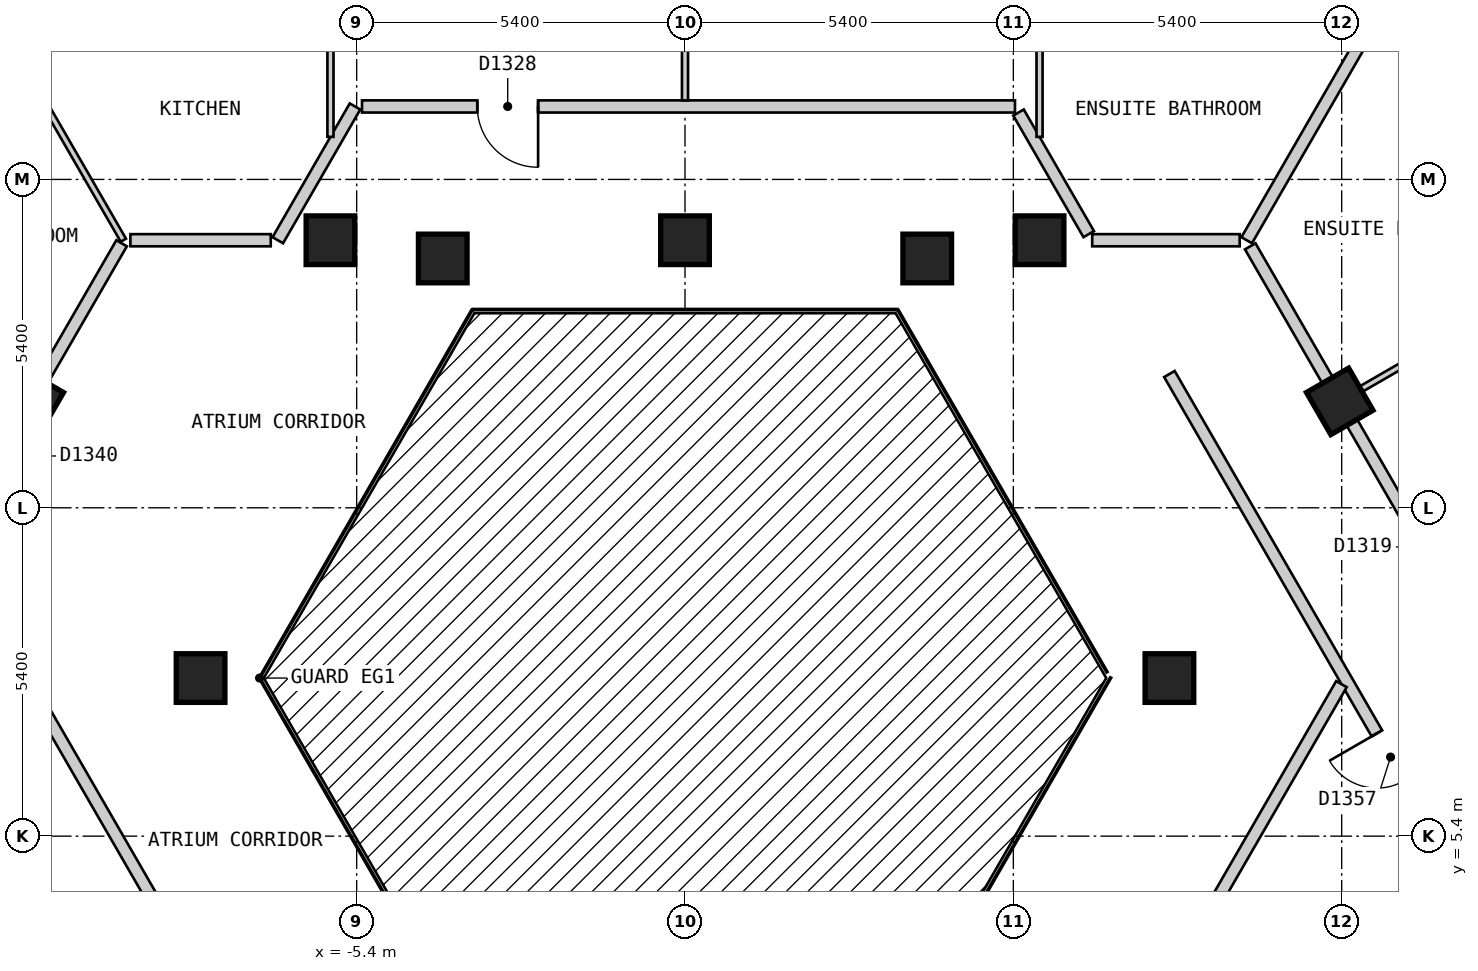
"""IFC4 building model, lengths in metres.
Left out: names, types, materials, properties, quantities, classifications, styles, units other than length and angle.
Written with IfcOpenShell. Run it as: python <this file> out.ifc"""

import sys

from ifc_helpers import new_model, si_unit, direction, frame, frame_2d, origin, origin_2d, place, context, subcontext, project, spatial, rectangle, extrude, element, fill, save


model = new_model("IFC4")
c1 = context("Model", 3, precision=1e-05, world=origin(), true_north=direction((0.0, 1.0)))
c2 = subcontext(c1, "Body", "Model", "MODEL_VIEW")
j1 = project(units=[si_unit("LENGTHUNIT", "METRE"), si_unit("PLANEANGLEUNIT", "RADIAN")], contexts=[c1])
p1 = place(None, origin())
s1 = spatial("IfcSite", under=j1, at=p1, CompositionType="ELEMENT")
p2 = place(p1, origin())
s2 = spatial("IfcBuilding", under=s1, at=p2, CompositionType="ELEMENT")
p3 = place(p2, frame((0.0, 0.0, 147.6)))
s3 = spatial("IfcBuildingStorey", under=s2, at=p3, CompositionType="ELEMENT", Elevation=147.6)
for number, where, z_axis, x_axis in (
    (1, (7.967, 8.0, 0.0), (0.0, 0.0, 1.0), (1.0, 0.0, 0.0)),
    (2, (10.768, 12.55, 0.0), (0.0, 0.0, 1.0), (-0.5, 0.866, 0.0)),
    (3, (5.831, 15.2, 0.0), (0.0, 0.0, 1.0), (-1.0, 0.0, 0.0)),
    (4, (3.984, 14.9, 0.0), (0.0, 0.0, 1.0), (1.0, 0.0, 0.0)),
    (5, (0.0, 15.2, 0.0), (0.0, 0.0, 1.0), (-1.0, 0.0, 0.0)),
    (6, (-3.984, 14.9, 0.0), (0.0, 0.0, 1.0), (1.0, 0.0, 0.0)),
    (7, (-5.831, 15.2, 0.0), (0.0, 0.0, 1.0), (-1.0, 0.0, 0.0)),
    (8, (-10.768, 12.55, 0.0), (0.0, 0.0, 1.0), (-0.5, -0.866, 0.0)),
    (9, (-7.967, 8.0, 0.0), (0.0, 0.0, 1.0), (1.0, 0.0, 0.0)),
):
    element("IfcColumn", number, at=place(p3, frame(where, z_axis=z_axis, x_axis=x_axis)), inside=s3, PredefinedType="COLUMN", context=c2, shape_type="SweptSolid", body=[
        extrude(rectangle(XDim=0.8, YDim=0.8, at=origin_2d()), origin(), (0.0, 0.0, 1.0), 3.0),
    ])
p4 = place(p3, frame((-10.796, 7.9, 0.0), z_axis=(0.0, 0.0, 1.0), x_axis=(0.499954271211, -0.866051803703, 0.0)))
e10 = element("IfcWall", 10, at=p4, inside=s3, PredefinedType="PARTITIONING", context=c2, shape_type="SweptSolid", body=[
    extrude(rectangle(XDim=7.536, YDim=0.2, at=frame_2d((3.768, 0.0))), origin(), (0.0, 0.0, 1.0), 2.7),
])
p5 = place(p3, frame((5.485, 17.3, 0.0), z_axis=(0.0, 0.0, 1.0), x_axis=(0.500027479704, -0.866009537788, 0.0)))
e11 = element("IfcWall", 11, at=p5, inside=s3, PredefinedType="PARTITIONING", context=c2, shape_type="SweptSolid", body=[
    extrude(rectangle(XDim=2.309, YDim=0.2, at=frame_2d((1.155, 0.0))), origin(), (0.0, 0.0, 1.0), 2.7),
])
p6 = place(p3, frame((7.967, 13.0, 0.0), z_axis=(0.0, 0.0, 1.0), x_axis=(0.50003774998, -0.866003607726, 0.0)))
e12 = element("IfcWall", 12, at=p6, inside=s3, PredefinedType="PARTITIONING", context=c2, shape_type="SweptSolid", body=[
    extrude(rectangle(XDim=14.433, YDim=0.2, at=frame_2d((7.217, 0.0))), origin(), (0.0, 0.0, 1.0), 2.7),
])
p7 = place(p6, frame((6.824, 0.0, 0.0)))
e13 = element("IfcOpeningElement", 13, at=p7, cuts=e12, PredefinedType="OPENING", context=c2, shape_type="SweptSolid", body=[
    extrude(rectangle(XDim=0.9, YDim=2.1, at=frame_2d((0.45, 1.05))), frame((0.0, 0.11, 0.0), z_axis=(0.0, -1.0, 0.0), x_axis=(1.0, 0.0, 0.0)), (0.0, 0.0, 1.0), 0.22),
])
p8 = place(p3, frame((9.296, 15.1, 0.0), z_axis=(0.0, 0.0, 1.0), x_axis=(0.499974024244, -0.866040400375, 0.0)))
e14 = element("IfcWall", 14, at=p8, inside=s3, PredefinedType="PARTITIONING", context=c2, shape_type="SweptSolid", body=[
    extrude(rectangle(XDim=16.857, YDim=0.2, at=frame_2d((8.429, 0.0))), origin(), (0.0, 0.0, 1.0), 2.7),
])
p9 = place(p8, frame((5.209, 0.0, 0.0)))
e15 = element("IfcOpeningElement", 15, at=p9, cuts=e14, PredefinedType="OPENING", context=c2, shape_type="SweptSolid", body=[
    extrude(rectangle(XDim=1.0, YDim=2.1, at=frame_2d((0.5, 1.05))), frame((0.0, 0.11, 0.0), z_axis=(0.0, -1.0, 0.0), x_axis=(1.0, 0.0, 0.0)), (0.0, 0.0, 1.0), 0.22),
])
p10 = place(p3, frame((-9.121, 15.2, 0.0), z_axis=(0.0, 0.0, 1.0), x_axis=(1.0, 0.0, 0.0)))
e16 = element("IfcWall", 16, at=p10, inside=s3, PredefinedType="PARTITIONING", context=c2, shape_type="SweptSolid", body=[
    extrude(rectangle(XDim=2.308, YDim=0.2, at=frame_2d((1.154, 0.0))), origin(), (0.0, 0.0, 1.0), 2.7),
])
p11 = place(p3, frame((6.697, 15.2, 0.0), z_axis=(0.0, 0.0, 1.0), x_axis=(1.0, 0.0, 0.0)))
e17 = element("IfcWall", 17, at=p11, inside=s3, PredefinedType="PARTITIONING", context=c2, shape_type="SweptSolid", body=[
    extrude(rectangle(XDim=2.425, YDim=0.2, at=frame_2d((1.212, 0.0))), origin(), (0.0, 0.0, 1.0), 2.7),
])
p12 = place(p3, frame((-5.312, 17.4, 0.0), z_axis=(0.0, 0.0, 1.0), x_axis=(1.0, 0.0, 0.0)))
e18 = element("IfcWall", 18, at=p12, inside=s3, PredefinedType="PARTITIONING", context=c2, shape_type="SweptSolid", body=[
    extrude(rectangle(XDim=10.739, YDim=0.2, at=frame_2d((5.37, 0.0))), origin(), (0.0, 0.0, 1.0), 2.7),
])
p13 = place(p12, frame((1.896, 0.0, 0.0)))
e19 = element("IfcOpeningElement", 19, at=p13, cuts=e18, PredefinedType="OPENING", context=c2, shape_type="SweptSolid", body=[
    extrude(rectangle(XDim=1.0, YDim=2.1, at=frame_2d((0.5, 1.05))), frame((0.0, 0.11, 0.0), z_axis=(0.0, -1.0, 0.0), x_axis=(1.0, 0.0, 0.0)), (0.0, 0.0, 1.0), 0.22),
])
p14 = place(p3, frame((7.028, 1.373, 0.0), z_axis=(0.0, 0.0, 1.0), x_axis=(0.499954271211, 0.866051803703, 0.0)))
e20 = element("IfcWall", 20, at=p14, inside=s3, PredefinedType="PARTITIONING", context=c2, shape_type="SweptSolid", body=[
    extrude(rectangle(XDim=7.536, YDim=0.2, at=frame_2d((3.768, 0.0))), origin(), (0.0, 0.0, 1.0), 2.7),
])
p15 = place(p3, frame((-6.697, 15.2, 0.0), z_axis=(0.0, 0.0, 1.0), x_axis=(0.499963722229, 0.866046347752, 0.0)))
e21 = element("IfcWall", 21, at=p15, inside=s3, PredefinedType="PARTITIONING", context=c2, shape_type="SweptSolid", body=[
    extrude(rectangle(XDim=2.54, YDim=0.2, at=frame_2d((1.27, 0.0))), origin(), (0.0, 0.0, 1.0), 2.7),
])
p16 = place(p3, frame((-17.724, 0.5, 0.0), z_axis=(0.0, 0.0, 1.0), x_axis=(0.499994801602, 0.86602840506, 0.0)))
e22 = element("IfcWall", 22, at=p16, inside=s3, PredefinedType="PARTITIONING", context=c2, shape_type="SweptSolid", body=[
    extrude(rectangle(XDim=16.916, YDim=0.2, at=frame_2d((8.458, 0.0))), origin(), (0.0, 0.0, 1.0), 2.7),
])
p17 = place(p16, frame((10.672, 0.0, 0.0)))
e23 = element("IfcOpeningElement", 23, at=p17, cuts=e22, PredefinedType="OPENING", context=c2, shape_type="SweptSolid", body=[
    extrude(rectangle(XDim=1.0, YDim=2.1, at=frame_2d((0.5, 1.05))), frame((0.0, 0.11, 0.0), z_axis=(0.0, -1.0, 0.0), x_axis=(1.0, 0.0, 0.0)), (0.0, 0.0, 1.0), 0.22),
])
p18 = place(p16, frame((5.187, 0.0, 0.0)))
e24 = element("IfcOpeningElement", 24, at=p18, cuts=e22, PredefinedType="OPENING", context=c2, shape_type="SweptSolid", body=[
    extrude(rectangle(XDim=1.0, YDim=2.1, at=frame_2d((0.5, 1.05))), frame((0.0, 0.11, 0.0), z_axis=(0.0, -1.0, 0.0), x_axis=(1.0, 0.0, 0.0)), (0.0, 0.0, 1.0), 0.22),
])
p19 = place(p16, frame((0.566, 0.0, 0.0)))
e25 = element("IfcOpeningElement", 25, at=p19, cuts=e22, PredefinedType="OPENING", context=c2, shape_type="SweptSolid", body=[
    extrude(rectangle(XDim=1.0, YDim=2.1, at=frame_2d((0.5, 1.05))), frame((0.0, 0.11, 0.0), z_axis=(0.0, -1.0, 0.0), x_axis=(1.0, 0.0, 0.0)), (0.0, 0.0, 1.0), 0.22),
])
p20 = place(p3, frame((-14.37, 24.09, 0.0), z_axis=(0.0, 0.0, 1.0), x_axis=(0.50002438799, -0.866011322914, 0.0)))
e26 = element("IfcWall", 26, at=p20, inside=s3, PredefinedType="PARTITIONING", context=c2, shape_type="SweptSolid", body=[
    extrude(rectangle(XDim=10.266, YDim=0.1, at=frame_2d((5.133, 0.0))), origin(), (0.0, 0.0, 1.0), 2.7),
])
p21 = place(p20, frame((2.347, 0.0, 0.0)))
e27 = element("IfcOpeningElement", 27, at=p21, cuts=e26, PredefinedType="OPENING", context=c2, shape_type="SweptSolid", body=[
    extrude(rectangle(XDim=0.9, YDim=2.1, at=frame_2d((0.45, 1.05))), frame((0.0, 0.06, 0.0), z_axis=(0.0, -1.0, 0.0), x_axis=(1.0, 0.0, 0.0)), (0.0, 0.0, 1.0), 0.12),
])
p22 = place(p3, frame((11.713, 19.313, 0.0), z_axis=(0.0, 0.0, 1.0), x_axis=(0.499999523185, -0.866025679073, 0.0)))
e28 = element("IfcWall", 28, at=p22, inside=s3, PredefinedType="PARTITIONING", context=c2, shape_type="SweptSolid", body=[
    extrude(rectangle(XDim=21.738, YDim=0.1, at=frame_2d((10.869, 0.0))), origin(), (0.0, 0.0, 1.0), 2.7),
])
p23 = place(p22, frame((7.654, 0.0, 0.0)))
e29 = element("IfcOpeningElement", 29, at=p23, cuts=e28, PredefinedType="OPENING", context=c2, shape_type="SweptSolid", body=[
    extrude(rectangle(XDim=0.9, YDim=2.1, at=frame_2d((0.45, 1.05))), frame((0.0, 0.06, 0.0), z_axis=(0.0, -1.0, 0.0), x_axis=(1.0, 0.0, 0.0)), (0.0, 0.0, 1.0), 0.12),
])
p24 = place(p22, frame((13.202, 0.0, 0.0)))
e30 = element("IfcOpeningElement", 30, at=p24, cuts=e28, PredefinedType="OPENING", context=c2, shape_type="SweptSolid", body=[
    extrude(rectangle(XDim=0.8, YDim=2.1, at=frame_2d((0.4, 1.05))), frame((0.0, 0.06, 0.0), z_axis=(0.0, -1.0, 0.0), x_axis=(1.0, 0.0, 0.0)), (0.0, 0.0, 1.0), 0.12),
])
p25 = place(p22, frame((2.242, 0.0, 0.0)))
e31 = element("IfcOpeningElement", 31, at=p25, cuts=e28, PredefinedType="OPENING", context=c2, shape_type="SweptSolid", body=[
    extrude(rectangle(XDim=0.8, YDim=2.1, at=frame_2d((0.4, 1.05))), frame((0.0, 0.06, 0.0), z_axis=(0.0, -1.0, 0.0), x_axis=(1.0, 0.0, 0.0)), (0.0, 0.0, 1.0), 0.12),
])
p26 = place(p22, frame((18.696, 0.0, 0.0)))
e32 = element("IfcOpeningElement", 32, at=p26, cuts=e28, PredefinedType="OPENING", context=c2, shape_type="SweptSolid", body=[
    extrude(rectangle(XDim=0.8, YDim=2.1, at=frame_2d((0.4, 1.05))), frame((0.0, 0.06, 0.0), z_axis=(0.0, -1.0, 0.0), x_axis=(1.0, 0.0, 0.0)), (0.0, 0.0, 1.0), 0.12),
])
p27 = place(p3, frame((5.831, 16.9, 0.0), z_axis=(0.0, 0.0, 1.0), x_axis=(0.0, 1.0, 0.0)))
e33 = element("IfcWall", 33, at=p27, inside=s3, PredefinedType="PARTITIONING", context=c2, shape_type="SweptSolid", body=[
    extrude(rectangle(XDim=4.546, YDim=0.1, at=frame_2d((2.273, 0.0))), origin(), (0.0, 0.0, 1.0), 2.7),
])
p28 = place(p3, frame((0.0, 17.5, 0.0), z_axis=(0.0, 0.0, 1.0), x_axis=(0.0, 1.0, 0.0)))
e34 = element("IfcWall", 34, at=p28, inside=s3, PredefinedType="PARTITIONING", context=c2, shape_type="SweptSolid", body=[
    extrude(rectangle(XDim=3.896, YDim=0.1, at=frame_2d((1.948, 0.0))), origin(), (0.0, 0.0, 1.0), 2.7),
])
p29 = place(p28, frame((1.523, 0.0, 0.0)))
e35 = element("IfcOpeningElement", 35, at=p29, cuts=e34, PredefinedType="OPENING", context=c2, shape_type="SweptSolid", body=[
    extrude(rectangle(XDim=0.8, YDim=2.1, at=frame_2d((0.4, 1.05))), frame((0.0, 0.06, 0.0), z_axis=(0.0, -1.0, 0.0), x_axis=(1.0, 0.0, 0.0)), (0.0, 0.0, 1.0), 0.12),
])
p30 = place(p3, frame((-5.831, 16.9, 0.0), z_axis=(0.0, 0.0, 1.0), x_axis=(0.0, 1.0, 0.0)))
e36 = element("IfcWall", 36, at=p30, inside=s3, PredefinedType="PARTITIONING", context=c2, shape_type="SweptSolid", body=[
    extrude(rectangle(XDim=4.546, YDim=0.1, at=frame_2d((2.273, 0.0))), origin(), (0.0, 0.0, 1.0), 2.7),
])
p31 = place(p30, frame((1.723, 0.0, 0.0)))
e37 = element("IfcOpeningElement", 37, at=p31, cuts=e36, PredefinedType="OPENING", context=c2, shape_type="SweptSolid", body=[
    extrude(rectangle(XDim=0.9, YDim=2.1, at=frame_2d((0.45, 1.05))), frame((0.0, 0.06, 0.0), z_axis=(0.0, -1.0, 0.0), x_axis=(1.0, 0.0, 0.0)), (0.0, 0.0, 1.0), 0.12),
])
p32 = place(p3, frame((10.854, 12.6, 0.0), z_axis=(0.0, 0.0, 1.0), x_axis=(0.86606561423, 0.499930346997, 0.0)))
e38 = element("IfcWall", 38, at=p32, inside=s3, PredefinedType="PARTITIONING", context=c2, shape_type="SweptSolid", body=[
    extrude(rectangle(XDim=4.1, YDim=0.1, at=frame_2d((2.05, 0.0))), origin(), (0.0, 0.0, 1.0), 2.7),
])
p33 = place(p3, frame((9.238, 15.2, 0.0), z_axis=(0.0, 0.0, 1.0), x_axis=(0.49993863487, 0.86606083006, 0.0)))
e39 = element("IfcWall", 39, at=p33, inside=s3, PredefinedType="PARTITIONING", context=c2, shape_type="SweptSolid", body=[
    extrude(rectangle(XDim=4.692, YDim=0.2, at=frame_2d((2.346, 0.0))), origin(), (0.0, 0.0, 1.0), 2.7),
])
p34 = place(p13, origin())
e40 = element("IfcDoor", 40, at=p34, inside=s3, OperationType="SINGLE_SWING_RIGHT", PredefinedType="DOOR", context=c2, shape_type="SweptSolid", body=[
    extrude(rectangle(XDim=1.0, YDim=2.1, at=frame_2d((0.5, 1.05))), frame((0.0, 0.025, 0.0), z_axis=(0.0, -1.0, 0.0), x_axis=(1.0, 0.0, 0.0)), (0.0, 0.0, 1.0), 0.05),
])
fill(e19, e40)
p35 = place(p7, origin())
e41 = element("IfcDoor", 41, at=p35, inside=s3, OperationType="SINGLE_SWING_LEFT", PredefinedType="DOOR", context=c2, shape_type="SweptSolid", body=[
    extrude(rectangle(XDim=0.9, YDim=2.1, at=frame_2d((0.45, 1.05))), frame((0.0, 0.025, 0.0), z_axis=(0.0, -1.0, 0.0), x_axis=(1.0, 0.0, 0.0)), (0.0, 0.0, 1.0), 0.05),
])
fill(e13, e41)
save(model, sys.argv[1])
